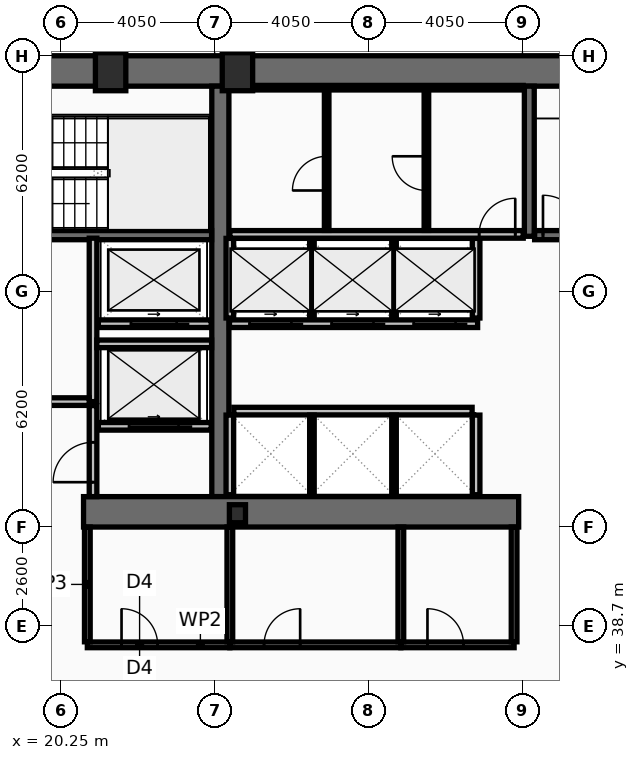
"""IFC4 building model, lengths in metres.
Left out: names, types, materials, properties, quantities, classifications, styles, units other than length and angle.
Written with IfcOpenShell. Run it as: python <this file> out.ifc"""

import sys

from ifc_helpers import new_model, si_unit, direction, frame, frame_2d, origin, origin_2d, place, context, subcontext, project, spatial, rectangle, hollow_rectangle, i_section, extrude, element, fill, save


model = new_model("IFC4")
c1 = context("Model", 3, precision=1e-05, world=origin(), true_north=direction((0.0, 1.0)))
c2 = subcontext(c1, "Body", "Model", "MODEL_VIEW")
j1 = project(units=[si_unit("LENGTHUNIT", "METRE"), si_unit("PLANEANGLEUNIT", "RADIAN")], contexts=[c1])
p1 = place(None, origin())
s1 = spatial("IfcSite", under=j1, at=p1, CompositionType="ELEMENT")
p2 = place(p1, origin())
s2 = spatial("IfcBuilding", under=s1, at=p2, CompositionType="ELEMENT")
p3 = place(p2, frame((0.0, 0.0, 73.8)))
s3 = spatial("IfcBuildingStorey", under=s2, at=p3, CompositionType="ELEMENT", Elevation=73.8)
p4 = place(p3, frame((16.2, 53.3, 0.0), z_axis=(0.0, 0.0, 1.0), x_axis=(1.0, 0.0, 0.0)))
e1 = element("IfcWall", 1, at=p4, inside=s3, PredefinedType="SHEAR", context=c2, shape_type="SweptSolid", body=[
    extrude(rectangle(XDim=40.5, YDim=0.8, at=frame_2d((20.25, 0.0))), origin(), (0.0, 0.0, 1.0), 3.82),
])
p5 = place(p3, frame((24.45, 42.1, 0.0), z_axis=(0.0, 0.0, 1.0), x_axis=(0.0, 1.0, 0.0)))
e2 = element("IfcWall", 2, at=p5, inside=s3, PredefinedType="SHEAR", context=c2, shape_type="SweptSolid", body=[
    extrude(rectangle(XDim=10.8, YDim=0.45, at=frame_2d((5.4, 0.0))), origin(), (0.0, 0.0, 1.0), 3.82),
])
p6 = place(p3, frame((32.3, 41.7, 0.0), z_axis=(0.0, 0.0, 1.0), x_axis=(-1.0, 0.0, 0.0)))
e3 = element("IfcWall", 3, at=p6, inside=s3, PredefinedType="SHEAR", context=c2, shape_type="SweptSolid", body=[
    extrude(rectangle(XDim=11.45, YDim=0.8, at=frame_2d((5.725, 0.0))), origin(), (0.0, 0.0, 1.0), 3.82),
])
p7 = place(p3, frame((32.58, 48.95, 0.0), z_axis=(0.0, 0.0, 1.0), x_axis=(0.0, 1.0, 0.0)))
e4 = element("IfcWall", 4, at=p7, inside=s3, PredefinedType="SHEAR", context=c2, shape_type="SweptSolid", body=[
    extrude(rectangle(XDim=3.95, YDim=0.26, at=frame_2d((1.975, 0.0))), origin(), (0.0, 0.0, 1.0), 3.82),
])
p8 = place(p3, frame((17.0, 48.98, 0.0), z_axis=(0.0, 0.0, 1.0), x_axis=(1.0, 0.0, 0.0)))
e5 = element("IfcWall", 5, at=p8, inside=s3, PredefinedType="SHEAR", context=c2, shape_type="SweptSolid", body=[
    extrude(rectangle(XDim=7.22, YDim=0.24, at=frame_2d((3.61, 0.0))), origin(), (0.0, 0.0, 1.0), 3.82),
])
p9 = place(p8, frame((0.22, 0.0, 0.0)))
e6 = element("IfcOpeningElement", 6, at=p9, cuts=e5, PredefinedType="OPENING", context=c2, shape_type="SweptSolid", body=[
    extrude(rectangle(XDim=1.05, YDim=2.15, at=frame_2d((0.525, 1.075))), frame((0.0, 0.13, 0.0), z_axis=(0.0, -1.0, 0.0), x_axis=(1.0, 0.0, 0.0)), (0.0, 0.0, 1.0), 0.26),
])
p10 = place(p3, frame((32.72, 48.98, 0.0), z_axis=(0.0, 0.0, 1.0), x_axis=(1.0, 0.0, 0.0)))
e7 = element("IfcWall", 7, at=p10, inside=s3, PredefinedType="SHEAR", context=c2, shape_type="SweptSolid", body=[
    extrude(rectangle(XDim=7.56, YDim=0.24, at=frame_2d((3.78, 0.0))), origin(), (0.0, 0.0, 1.0), 3.82),
])
p11 = place(p10, frame((0.22, 0.0, 0.0)))
e8 = element("IfcOpeningElement", 8, at=p11, cuts=e7, PredefinedType="OPENING", context=c2, shape_type="SweptSolid", body=[
    extrude(rectangle(XDim=1.05, YDim=2.15, at=frame_2d((0.525, 1.075))), frame((0.0, 0.13, 0.0), z_axis=(0.0, -1.0, 0.0), x_axis=(1.0, 0.0, 0.0)), (0.0, 0.0, 1.0), 0.26),
])
for number, where, z_axis, x_axis in (
    (9, (21.562, 53.28, 0.0), (0.0, 0.0, 1.0), (1.0, 0.0, 0.0)),
    (10, (24.9, 53.28, 0.0), (0.0, 0.0, 1.0), (1.0, 0.0, 0.0)),
):
    element("IfcColumn", number, at=place(p3, frame(where, z_axis=z_axis, x_axis=x_axis)), inside=s3, PredefinedType="COLUMN", context=c2, shape_type="SweptSolid", body=[
        extrude(hollow_rectangle(XDim=0.8, YDim=1.0, WallThickness=0.055, at=origin_2d()), origin(), (0.0, 0.0, 1.0), 4.0),
    ])
p12 = place(p3, frame((24.9, 41.65, 0.0), z_axis=(0.0, 0.0, 1.0), x_axis=(1.0, 0.0, 0.0)))
e11 = element("IfcColumn", 11, at=p12, inside=s3, PredefinedType="COLUMN", context=c2, shape_type="SweptSolid", body=[
    extrude(i_section(OverallWidth=0.424, OverallDepth=0.474, WebThickness=0.048, FlangeThickness=0.077, at=origin_2d()), origin(), (0.0, 0.0, 1.0), 4.0),
])
p13 = place(p3, frame((24.21, 43.95, 0.0), z_axis=(0.0, 0.0, 1.0), x_axis=(-1.0, 0.0, 0.0)))
e12 = element("IfcWall", 12, at=p13, inside=s3, PredefinedType="PARTITIONING", context=c2, shape_type="SweptSolid", body=[
    extrude(rectangle(XDim=2.97, YDim=0.2, at=frame_2d((1.485, 0.0))), origin(), (0.0, 0.0, 1.0), 3.82),
])
p14 = place(p13, frame((0.86, 0.0, 0.0)))
e13 = element("IfcOpeningElement", 13, at=p14, cuts=e12, PredefinedType="OPENING", context=c2, shape_type="SweptSolid", body=[
    extrude(rectangle(XDim=1.3, YDim=2.18, at=frame_2d((0.65, 1.09))), frame((0.0, 0.11, 0.0), z_axis=(0.0, -1.0, 0.0), x_axis=(1.0, 0.0, 0.0)), (0.0, 0.0, 1.0), 0.22),
])
p15 = place(p3, frame((24.21, 46.65, 0.0), z_axis=(0.0, 0.0, 1.0), x_axis=(-1.0, 0.0, 0.0)))
e14 = element("IfcWall", 14, at=p15, inside=s3, PredefinedType="PARTITIONING", context=c2, shape_type="SweptSolid", body=[
    extrude(rectangle(XDim=2.97, YDim=0.2, at=frame_2d((1.485, 0.0))), origin(), (0.0, 0.0, 1.0), 3.82),
])
p16 = place(p15, frame((0.91, 0.0, 0.0)))
e15 = element("IfcOpeningElement", 15, at=p16, cuts=e14, PredefinedType="OPENING", context=c2, shape_type="SweptSolid", body=[
    extrude(rectangle(XDim=1.2, YDim=2.18, at=frame_2d((0.6, 1.09))), frame((0.0, 0.11, 0.0), z_axis=(0.0, -1.0, 0.0), x_axis=(1.0, 0.0, 0.0)), (0.0, 0.0, 1.0), 0.22),
])
p17 = place(p3, frame((31.22, 46.65, 0.0), z_axis=(0.0, 0.0, 1.0), x_axis=(-1.0, 0.0, 0.0)))
e16 = element("IfcWall", 16, at=p17, inside=s3, PredefinedType="PARTITIONING", context=c2, shape_type="SweptSolid", body=[
    extrude(rectangle(XDim=6.53, YDim=0.2, at=frame_2d((3.265, 0.0))), origin(), (0.0, 0.0, 1.0), 3.82),
])
p18 = place(p17, frame((4.9, 0.0, 0.0)))
e17 = element("IfcOpeningElement", 17, at=p18, cuts=e16, PredefinedType="OPENING", context=c2, shape_type="SweptSolid", body=[
    extrude(rectangle(XDim=1.1, YDim=2.18, at=frame_2d((0.55, 1.09))), frame((0.0, 0.11, 0.0), z_axis=(0.0, -1.0, 0.0), x_axis=(1.0, 0.0, 0.0)), (0.0, 0.0, 1.0), 0.22),
])
p19 = place(p17, frame((2.74, 0.0, 0.0)))
e18 = element("IfcOpeningElement", 18, at=p19, cuts=e16, PredefinedType="OPENING", context=c2, shape_type="SweptSolid", body=[
    extrude(rectangle(XDim=1.1, YDim=2.18, at=frame_2d((0.55, 1.09))), frame((0.0, 0.11, 0.0), z_axis=(0.0, -1.0, 0.0), x_axis=(1.0, 0.0, 0.0)), (0.0, 0.0, 1.0), 0.22),
])
p20 = place(p17, frame((0.58, 0.0, 0.0)))
e19 = element("IfcOpeningElement", 19, at=p20, cuts=e16, PredefinedType="OPENING", context=c2, shape_type="SweptSolid", body=[
    extrude(rectangle(XDim=1.1, YDim=2.18, at=frame_2d((0.55, 1.09))), frame((0.0, 0.11, 0.0), z_axis=(0.0, -1.0, 0.0), x_axis=(1.0, 0.0, 0.0)), (0.0, 0.0, 1.0), 0.22),
])
p21 = place(p3, frame((21.1, 44.6, 0.0), z_axis=(0.0, 0.0, 1.0), x_axis=(0.0, 1.0, 0.0)))
e20 = element("IfcWall", 20, at=p21, inside=s3, PredefinedType="PARTITIONING", context=c2, shape_type="SweptSolid", body=[
    extrude(rectangle(XDim=4.3, YDim=0.2, at=frame_2d((2.15, 0.0))), origin(), (0.0, 0.0, 1.0), 3.82),
])
p22 = place(p3, frame((17.0, 44.6, 0.0), z_axis=(0.0, 0.0, 1.0), x_axis=(1.0, 0.0, 0.0)))
e21 = element("IfcWall", 21, at=p22, inside=s3, PredefinedType="PARTITIONING", context=c2, shape_type="SweptSolid", body=[
    extrude(rectangle(XDim=4.0, YDim=0.2, at=frame_2d((2.0, 0.0))), origin(), (0.0, 0.0, 1.0), 3.82),
])
p23 = place(p22, frame((1.25, 0.0, 0.0)))
e22 = element("IfcOpeningElement", 22, at=p23, cuts=e21, PredefinedType="OPENING", context=c2, shape_type="SweptSolid", body=[
    extrude(rectangle(XDim=1.05, YDim=2.15, at=frame_2d((0.525, 1.075))), frame((0.0, 0.11, 0.0), z_axis=(0.0, -1.0, 0.0), x_axis=(1.0, 0.0, 0.0)), (0.0, 0.0, 1.0), 0.22),
])
p24 = place(p3, frame((21.2, 46.12, 0.0), z_axis=(0.0, 0.0, 1.0), x_axis=(1.0, 0.0, 0.0)))
e23 = element("IfcWall", 23, at=p24, inside=s3, PredefinedType="PARTITIONING", context=c2, shape_type="SweptSolid", body=[
    extrude(rectangle(XDim=3.02, YDim=0.2, at=frame_2d((1.51, 0.0))), origin(), (0.0, 0.0, 1.0), 3.82),
])
p25 = place(p3, frame((21.1, 42.1, 0.0), z_axis=(0.0, 0.0, 1.0), x_axis=(0.0, 1.0, 0.0)))
e24 = element("IfcWall", 24, at=p25, inside=s3, PredefinedType="PARTITIONING", context=c2, shape_type="SweptSolid", body=[
    extrude(rectangle(XDim=2.395, YDim=0.2, at=frame_2d((1.198, 0.0))), origin(), (0.0, 0.0, 1.0), 3.82),
])
p26 = place(p25, frame((0.38, 0.0, 0.0)))
e25 = element("IfcOpeningElement", 25, at=p26, cuts=e24, PredefinedType="OPENING", context=c2, shape_type="SweptSolid", body=[
    extrude(rectangle(XDim=1.05, YDim=2.15, at=frame_2d((0.525, 1.075))), frame((0.0, 0.11, 0.0), z_axis=(0.0, -1.0, 0.0), x_axis=(1.0, 0.0, 0.0)), (0.0, 0.0, 1.0), 0.22),
])
for number, where, z_axis, x_axis in (
    (26, (24.7, 46.8, 0.0), (0.0, 0.0, 1.0), (0.0, 1.0, 0.0)),
    (27, (31.18, 46.8, 0.0), (0.0, 0.0, 1.0), (0.0, 1.0, 0.0)),
):
    element("IfcWall", number, at=place(p3, frame(where, z_axis=z_axis, x_axis=x_axis)), inside=s3, PredefinedType="PARTITIONING", context=c2, shape_type="SweptSolid", body=[
        extrude(rectangle(XDim=2.095, YDim=0.2, at=frame_2d((1.047, 0.0))), origin(), (0.0, 0.0, 1.0), 3.82),
    ])
for number, where, z_axis, x_axis in (
    (28, (26.86, 46.8, 0.0), (0.0, 0.0, 1.0), (0.0, 1.0, 0.0)),
    (29, (29.02, 46.8, 0.0), (0.0, 0.0, 1.0), (0.0, 1.0, 0.0)),
):
    element("IfcWall", number, at=place(p3, frame(where, z_axis=z_axis, x_axis=x_axis)), inside=s3, PredefinedType="PARTITIONING", context=c2, shape_type="SweptSolid", body=[
        extrude(rectangle(XDim=2.095, YDim=0.12, at=frame_2d((1.047, 0.0))), origin(), (0.0, 0.0, 1.0), 3.82),
    ])
p27 = place(p3, frame((24.805, 44.35, 0.0), z_axis=(0.0, 0.0, 1.0), x_axis=(1.0, 0.0, 0.0)))
e30 = element("IfcWall", 30, at=p27, inside=s3, PredefinedType="PARTITIONING", context=c2, shape_type="SweptSolid", body=[
    extrude(rectangle(XDim=6.27, YDim=0.2, at=frame_2d((3.135, 0.0))), origin(), (0.0, 0.0, 1.0), 3.82),
])
for number, where, z_axis, x_axis in (
    (31, (24.7, 42.15, 0.0), (0.0, 0.0, 1.0), (0.0, 1.0, 0.0)),
    (32, (31.18, 42.15, 0.0), (0.0, 0.0, 1.0), (0.0, 1.0, 0.0)),
):
    element("IfcWall", number, at=place(p3, frame(where, z_axis=z_axis, x_axis=x_axis)), inside=s3, PredefinedType="PARTITIONING", context=c2, shape_type="SweptSolid", body=[
        extrude(rectangle(XDim=2.095, YDim=0.2, at=frame_2d((1.048, 0.0))), origin(), (0.0, 0.0, 1.0), 3.82),
    ])
for number, where, z_axis, x_axis in (
    (33, (26.86, 42.15, 0.0), (0.0, 0.0, 1.0), (0.0, 1.0, 0.0)),
    (34, (29.02, 42.15, 0.0), (0.0, 0.0, 1.0), (0.0, 1.0, 0.0)),
):
    element("IfcWall", number, at=place(p3, frame(where, z_axis=z_axis, x_axis=x_axis)), inside=s3, PredefinedType="PARTITIONING", context=c2, shape_type="SweptSolid", body=[
        extrude(rectangle(XDim=2.095, YDim=0.12, at=frame_2d((1.048, 0.0))), origin(), (0.0, 0.0, 1.0), 3.82),
    ])
p28 = place(p3, frame((24.7, 52.86, 0.0), z_axis=(0.0, 0.0, 1.0), x_axis=(1.0, 0.0, 0.0)))
e35 = element("IfcWall", 35, at=p28, inside=s3, PredefinedType="PARTITIONING", context=c2, shape_type="SweptSolid", body=[
    extrude(rectangle(XDim=7.72, YDim=0.12, at=frame_2d((3.86, 0.0))), origin(), (0.0, 0.0, 1.0), 3.82),
])
p29 = place(p3, frame((24.7, 49.0, 0.0), z_axis=(0.0, 0.0, 1.0), x_axis=(1.0, 0.0, 0.0)))
e36 = element("IfcWall", 36, at=p29, inside=s3, PredefinedType="PARTITIONING", context=c2, shape_type="SweptSolid", body=[
    extrude(rectangle(XDim=7.72, YDim=0.2, at=frame_2d((3.86, 0.0))), origin(), (0.0, 0.0, 1.0), 3.82),
])
p30 = place(p29, frame((6.56, 0.0, 0.0)))
e37 = element("IfcOpeningElement", 37, at=p30, cuts=e36, PredefinedType="OPENING", context=c2, shape_type="SweptSolid", body=[
    extrude(rectangle(XDim=0.95, YDim=2.1, at=frame_2d((0.475, 1.05))), frame((0.0, 0.11, 0.0), z_axis=(0.0, -1.0, 0.0), x_axis=(1.0, 0.0, 0.0)), (0.0, 0.0, 1.0), 0.22),
])
p31 = place(p3, frame((27.248, 49.105, 0.0), z_axis=(0.0, 0.0, 1.0), x_axis=(0.0, 1.0, 0.0)))
e38 = element("IfcWall", 38, at=p31, inside=s3, PredefinedType="PARTITIONING", context=c2, shape_type="SweptSolid", body=[
    extrude(rectangle(XDim=3.69, YDim=0.12, at=frame_2d((1.845, 0.0))), origin(), (0.0, 0.0, 1.0), 3.82),
])
p32 = place(p31, frame((1.05, 0.0, 0.0)))
e39 = element("IfcOpeningElement", 39, at=p32, cuts=e38, PredefinedType="OPENING", context=c2, shape_type="SweptSolid", body=[
    extrude(rectangle(XDim=0.9, YDim=2.05, at=frame_2d((0.45, 1.025))), frame((0.0, 0.07, 0.0), z_axis=(0.0, -1.0, 0.0), x_axis=(1.0, 0.0, 0.0)), (0.0, 0.0, 1.0), 0.14),
])
p33 = place(p3, frame((29.872, 49.105, 0.0), z_axis=(0.0, 0.0, 1.0), x_axis=(0.0, 1.0, 0.0)))
e40 = element("IfcWall", 40, at=p33, inside=s3, PredefinedType="PARTITIONING", context=c2, shape_type="SweptSolid", body=[
    extrude(rectangle(XDim=3.69, YDim=0.12, at=frame_2d((1.845, 0.0))), origin(), (0.0, 0.0, 1.0), 3.82),
])
p34 = place(p33, frame((1.05, 0.0, 0.0)))
e41 = element("IfcOpeningElement", 41, at=p34, cuts=e40, PredefinedType="OPENING", context=c2, shape_type="SweptSolid", body=[
    extrude(rectangle(XDim=0.9, YDim=2.05, at=frame_2d((0.45, 1.025))), frame((0.0, 0.07, 0.0), z_axis=(0.0, -1.0, 0.0), x_axis=(1.0, 0.0, 0.0)), (0.0, 0.0, 1.0), 0.14),
])
p35 = place(p3, frame((20.95, 38.2, 0.0), z_axis=(0.0, 0.0, 1.0), x_axis=(1.0, 0.0, 0.0)))
e42 = element("IfcWall", 42, at=p35, inside=s3, PredefinedType="PARTITIONING", context=c2, shape_type="SweptSolid", body=[
    extrude(rectangle(XDim=3.75, YDim=0.15, at=frame_2d((1.875, 0.0))), origin(), (0.0, 0.0, 1.0), 3.01),
])
p36 = place(p35, frame((0.9, 0.0, 0.0)))
e43 = element("IfcOpeningElement", 43, at=p36, cuts=e42, PredefinedType="OPENING", context=c2, shape_type="SweptSolid", body=[
    extrude(rectangle(XDim=0.95, YDim=2.05, at=frame_2d((0.475, 1.025))), frame((0.0, 0.085, 0.0), z_axis=(0.0, -1.0, 0.0), x_axis=(1.0, 0.0, 0.0)), (0.0, 0.0, 1.0), 0.17),
])
p37 = place(p3, frame((24.7, 38.2, 0.0), z_axis=(0.0, 0.0, 1.0), x_axis=(1.0, 0.0, 0.0)))
e44 = element("IfcWall", 44, at=p37, inside=s3, PredefinedType="PARTITIONING", context=c2, shape_type="SweptSolid", body=[
    extrude(rectangle(XDim=4.5, YDim=0.15, at=frame_2d((2.25, 0.0))), origin(), (0.0, 0.0, 1.0), 3.01),
])
p38 = place(p37, frame((0.9, 0.0, 0.0)))
e45 = element("IfcOpeningElement", 45, at=p38, cuts=e44, PredefinedType="OPENING", context=c2, shape_type="SweptSolid", body=[
    extrude(rectangle(XDim=0.95, YDim=2.05, at=frame_2d((0.475, 1.025))), frame((0.0, 0.085, 0.0), z_axis=(0.0, -1.0, 0.0), x_axis=(1.0, 0.0, 0.0)), (0.0, 0.0, 1.0), 0.17),
])
p39 = place(p3, frame((29.2, 38.2, 0.0), z_axis=(0.0, 0.0, 1.0), x_axis=(1.0, 0.0, 0.0)))
e46 = element("IfcWall", 46, at=p39, inside=s3, PredefinedType="PARTITIONING", context=c2, shape_type="SweptSolid", body=[
    extrude(rectangle(XDim=2.98, YDim=0.15, at=frame_2d((1.49, 0.0))), origin(), (0.0, 0.0, 1.0), 3.01),
])
p40 = place(p39, frame((0.7, 0.0, 0.0)))
e47 = element("IfcOpeningElement", 47, at=p40, cuts=e46, PredefinedType="OPENING", context=c2, shape_type="SweptSolid", body=[
    extrude(rectangle(XDim=0.95, YDim=2.05, at=frame_2d((0.475, 1.025))), frame((0.0, 0.085, 0.0), z_axis=(0.0, -1.0, 0.0), x_axis=(1.0, 0.0, 0.0)), (0.0, 0.0, 1.0), 0.17),
])
p41 = place(p3, frame((20.95, 38.28, 0.0), z_axis=(0.0, 0.0, 1.0), x_axis=(0.0, 1.0, 0.0)))
e48 = element("IfcWall", 48, at=p41, inside=s3, PredefinedType="PARTITIONING", context=c2, shape_type="SweptSolid", body=[
    extrude(rectangle(XDim=3.02, YDim=0.15, at=frame_2d((1.51, 0.0))), origin(), (0.0, 0.0, 1.0), 3.82),
])
p42 = place(p3, frame((24.7, 38.28, 0.0), z_axis=(0.0, 0.0, 1.0), x_axis=(0.0, 1.0, 0.0)))
e49 = element("IfcWall", 49, at=p42, inside=s3, PredefinedType="PARTITIONING", context=c2, shape_type="SweptSolid", body=[
    extrude(rectangle(XDim=3.02, YDim=0.15, at=frame_2d((1.51, 0.0))), origin(), (0.0, 0.0, 1.0), 3.01),
])
for number, where, z_axis, x_axis in (
    (50, (29.2, 38.28, 0.0), (0.0, 0.0, 1.0), (0.0, 1.0, 0.0)),
    (51, (32.18, 38.28, 0.0), (0.0, 0.0, 1.0), (0.0, 1.0, 0.0)),
):
    element("IfcWall", number, at=place(p3, frame(where, z_axis=z_axis, x_axis=x_axis)), inside=s3, PredefinedType="PARTITIONING", context=c2, shape_type="SweptSolid", body=[
        extrude(rectangle(XDim=3.02, YDim=0.15, at=frame_2d((1.51, 0.0))), origin(), (0.0, 0.0, 1.0), 3.82),
    ])
p43 = place(p11, origin())
e52 = element("IfcDoor", 52, at=p43, inside=s3, OperationType="SINGLE_SWING_LEFT", PredefinedType="DOOR", context=c2, shape_type="SweptSolid", body=[
    extrude(rectangle(XDim=1.05, YDim=2.15, at=frame_2d((0.525, 1.075))), frame((0.0, 0.025, 0.0), z_axis=(0.0, -1.0, 0.0), x_axis=(1.0, 0.0, 0.0)), (0.0, 0.0, 1.0), 0.05),
])
fill(e8, e52)
p44 = place(p14, origin())
e53 = element("IfcDoor", 53, at=p44, inside=s3, OperationType="SLIDING_TO_LEFT", PredefinedType="DOOR", context=c2, shape_type="SweptSolid", body=[
    extrude(rectangle(XDim=1.3, YDim=2.18, at=frame_2d((0.65, 1.09))), frame((0.0, 0.025, 0.0), z_axis=(0.0, -1.0, 0.0), x_axis=(1.0, 0.0, 0.0)), (0.0, 0.0, 1.0), 0.05),
])
fill(e13, e53)
p45 = place(p16, origin())
e54 = element("IfcDoor", 54, at=p45, inside=s3, OperationType="SLIDING_TO_LEFT", PredefinedType="DOOR", context=c2, shape_type="SweptSolid", body=[
    extrude(rectangle(XDim=1.2, YDim=2.18, at=frame_2d((0.6, 1.09))), frame((0.0, 0.025, 0.0), z_axis=(0.0, -1.0, 0.0), x_axis=(1.0, 0.0, 0.0)), (0.0, 0.0, 1.0), 0.05),
])
fill(e15, e54)
p46 = place(p18, origin())
e55 = element("IfcDoor", 55, at=p46, inside=s3, OperationType="SLIDING_TO_LEFT", PredefinedType="DOOR", context=c2, shape_type="SweptSolid", body=[
    extrude(rectangle(XDim=1.1, YDim=2.18, at=frame_2d((0.55, 1.09))), frame((0.0, 0.025, 0.0), z_axis=(0.0, -1.0, 0.0), x_axis=(1.0, 0.0, 0.0)), (0.0, 0.0, 1.0), 0.05),
])
fill(e17, e55)
p47 = place(p19, origin())
e56 = element("IfcDoor", 56, at=p47, inside=s3, OperationType="SLIDING_TO_LEFT", PredefinedType="DOOR", context=c2, shape_type="SweptSolid", body=[
    extrude(rectangle(XDim=1.1, YDim=2.18, at=frame_2d((0.55, 1.09))), frame((0.0, 0.025, 0.0), z_axis=(0.0, -1.0, 0.0), x_axis=(1.0, 0.0, 0.0)), (0.0, 0.0, 1.0), 0.05),
])
fill(e18, e56)
p48 = place(p20, origin())
e57 = element("IfcDoor", 57, at=p48, inside=s3, OperationType="SLIDING_TO_LEFT", PredefinedType="DOOR", context=c2, shape_type="SweptSolid", body=[
    extrude(rectangle(XDim=1.1, YDim=2.18, at=frame_2d((0.55, 1.09))), frame((0.0, 0.025, 0.0), z_axis=(0.0, -1.0, 0.0), x_axis=(1.0, 0.0, 0.0)), (0.0, 0.0, 1.0), 0.05),
])
fill(e19, e57)
p49 = place(p26, origin())
e58 = element("IfcDoor", 58, at=p49, inside=s3, OperationType="SINGLE_SWING_LEFT", PredefinedType="DOOR", context=c2, shape_type="SweptSolid", body=[
    extrude(rectangle(XDim=1.05, YDim=2.15, at=frame_2d((0.525, 1.075))), frame((0.0, 0.025, 0.0), z_axis=(0.0, -1.0, 0.0), x_axis=(1.0, 0.0, 0.0)), (0.0, 0.0, 1.0), 0.05),
])
fill(e25, e58)
p50 = place(p30, origin())
e59 = element("IfcDoor", 59, at=p50, inside=s3, OperationType="SINGLE_SWING_RIGHT", PredefinedType="DOOR", context=c2, shape_type="SweptSolid", body=[
    extrude(rectangle(XDim=0.95, YDim=2.1, at=frame_2d((0.475, 1.05))), frame((0.0, 0.025, 0.0), z_axis=(0.0, -1.0, 0.0), x_axis=(1.0, 0.0, 0.0)), (0.0, 0.0, 1.0), 0.05),
])
fill(e37, e59)
p51 = place(p32, origin())
e60 = element("IfcDoor", 60, at=p51, inside=s3, OperationType="SINGLE_SWING_LEFT", PredefinedType="DOOR", context=c2, shape_type="SweptSolid", body=[
    extrude(rectangle(XDim=0.9, YDim=2.05, at=frame_2d((0.45, 1.025))), frame((0.0, 0.025, 0.0), z_axis=(0.0, -1.0, 0.0), x_axis=(1.0, 0.0, 0.0)), (0.0, 0.0, 1.0), 0.05),
])
fill(e39, e60)
p52 = place(p34, origin())
e61 = element("IfcDoor", 61, at=p52, inside=s3, OperationType="SINGLE_SWING_RIGHT", PredefinedType="DOOR", context=c2, shape_type="SweptSolid", body=[
    extrude(rectangle(XDim=0.9, YDim=2.05, at=frame_2d((0.45, 1.025))), frame((0.0, 0.025, 0.0), z_axis=(0.0, -1.0, 0.0), x_axis=(1.0, 0.0, 0.0)), (0.0, 0.0, 1.0), 0.05),
])
fill(e41, e61)
p53 = place(p36, origin())
e62 = element("IfcDoor", 62, at=p53, inside=s3, OperationType="SINGLE_SWING_LEFT", PredefinedType="DOOR", context=c2, shape_type="SweptSolid", body=[
    extrude(rectangle(XDim=0.95, YDim=2.05, at=frame_2d((0.475, 1.025))), frame((0.0, 0.025, 0.0), z_axis=(0.0, -1.0, 0.0), x_axis=(1.0, 0.0, 0.0)), (0.0, 0.0, 1.0), 0.05),
])
fill(e43, e62)
p54 = place(p38, origin())
e63 = element("IfcDoor", 63, at=p54, inside=s3, OperationType="SINGLE_SWING_RIGHT", PredefinedType="DOOR", context=c2, shape_type="SweptSolid", body=[
    extrude(rectangle(XDim=0.95, YDim=2.05, at=frame_2d((0.475, 1.025))), frame((0.0, 0.025, 0.0), z_axis=(0.0, -1.0, 0.0), x_axis=(1.0, 0.0, 0.0)), (0.0, 0.0, 1.0), 0.05),
])
fill(e45, e63)
p55 = place(p40, origin())
e64 = element("IfcDoor", 64, at=p55, inside=s3, OperationType="SINGLE_SWING_LEFT", PredefinedType="DOOR", context=c2, shape_type="SweptSolid", body=[
    extrude(rectangle(XDim=0.95, YDim=2.05, at=frame_2d((0.475, 1.025))), frame((0.0, 0.025, 0.0), z_axis=(0.0, -1.0, 0.0), x_axis=(1.0, 0.0, 0.0)), (0.0, 0.0, 1.0), 0.05),
])
fill(e47, e64)
save(model, sys.argv[1])
